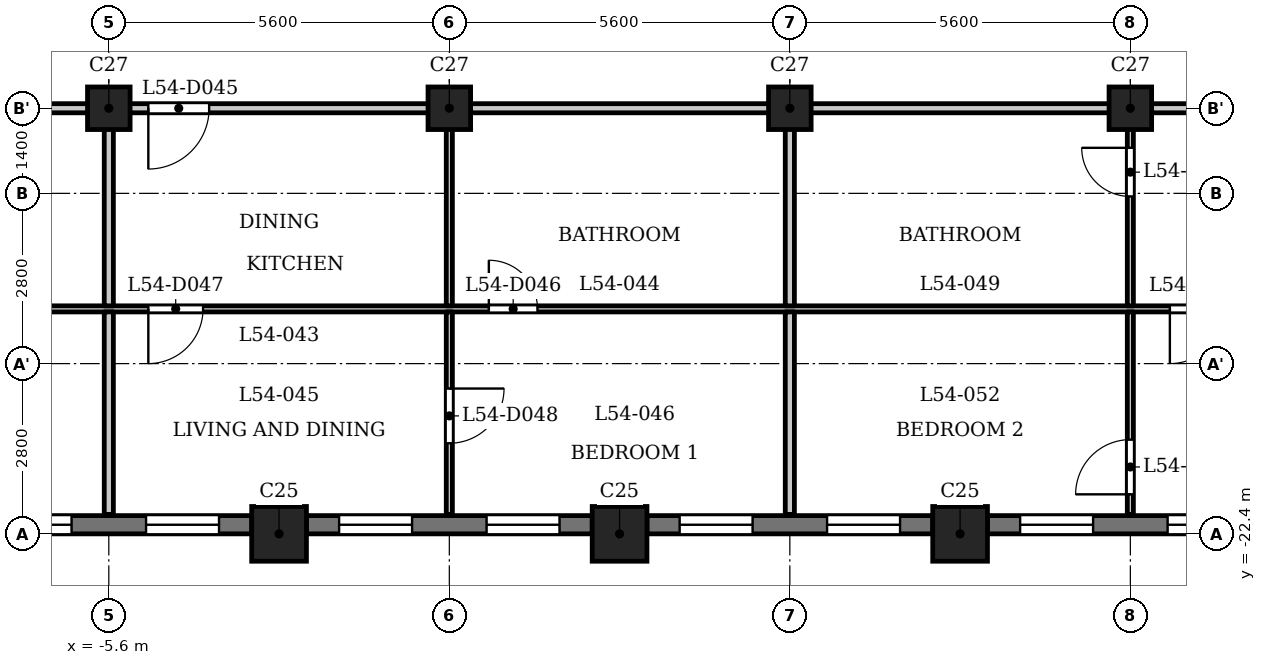
"""IFC4 building model, lengths in metres.
Left out: names, types, materials, properties, quantities, classifications, styles, units other than length and angle.
Written with IfcOpenShell. Run it as: python <this file> out.ifc"""

import sys

from ifc_helpers import new_model, si_unit, direction, frame, frame_2d, origin, origin_2d, place, context, subcontext, project, spatial, rectangle, extrude, element, fill, save


model = new_model("IFC4")
c1 = context("Model", 3, precision=1e-05, world=origin(), true_north=direction((0.0, 1.0)))
c2 = subcontext(c1, "Body", "Model", "MODEL_VIEW")
j1 = project(units=[si_unit("LENGTHUNIT", "METRE"), si_unit("PLANEANGLEUNIT", "RADIAN")], contexts=[c1])
p1 = place(None, origin())
s1 = spatial("IfcSite", under=j1, at=p1, CompositionType="ELEMENT")
p2 = place(p1, origin())
s2 = spatial("IfcBuilding", under=s1, at=p2, CompositionType="ELEMENT")
p3 = place(p2, frame((0.0, 0.0, 209.9)))
s3 = spatial("IfcBuildingStorey", under=s2, at=p3, CompositionType="ELEMENT", Elevation=209.9)
for number, where, z_axis, x_axis in (
    (1, (-2.8, -22.4, 0.0), (0.0, 0.0, 1.0), (1.0, 0.0, 0.0)),
    (2, (2.8, -22.4, 0.0), (0.0, 0.0, 1.0), (1.0, 0.0, 0.0)),
    (3, (8.4, -22.4, 0.0), (0.0, 0.0, 1.0), (1.0, 0.0, 0.0)),
):
    element("IfcColumn", number, at=place(p3, frame(where, z_axis=z_axis, x_axis=x_axis)), inside=s3, PredefinedType="COLUMN", context=c2, shape_type="SweptSolid", body=[
        extrude(rectangle(XDim=0.9, YDim=0.9, at=origin_2d()), origin(), (0.0, 0.0, 1.0), 3.5),
    ])
for number, where, z_axis, x_axis in (
    (4, (-5.6, -15.4, 0.0), (0.0, 0.0, 1.0), (1.0, 0.0, 0.0)),
    (5, (0.0, -15.4, 0.0), (0.0, 0.0, 1.0), (1.0, 0.0, 0.0)),
    (6, (5.6, -15.4, 0.0), (0.0, 0.0, 1.0), (1.0, 0.0, 0.0)),
    (7, (11.2, -15.4, 0.0), (0.0, 0.0, 1.0), (1.0, 0.0, 0.0)),
):
    element("IfcColumn", number, at=place(p3, frame(where, z_axis=z_axis, x_axis=x_axis)), inside=s3, PredefinedType="COLUMN", context=c2, shape_type="SweptSolid", body=[
        extrude(rectangle(XDim=0.7, YDim=0.7, at=origin_2d()), origin(), (0.0, 0.0, 1.0), 3.5),
    ])
p4 = place(p3, frame((-7.95, -22.25, 0.0), z_axis=(0.0, 0.0, 1.0), x_axis=(1.0, 0.0, 0.0)))
e8 = element("IfcWall", 8, at=p4, inside=s3, PredefinedType="SOLIDWALL", context=c2, shape_type="SweptSolid", body=[
    extrude(rectangle(XDim=4.7, YDim=0.3, at=frame_2d((2.35, 0.0))), origin(), (0.0, 0.0, 1.0), 2.5),
])
p5 = place(p4, frame((0.538, 0.0, 0.6)))
e9 = element("IfcOpeningElement", 9, at=p5, cuts=e8, PredefinedType="OPENING", context=c2, shape_type="SweptSolid", body=[
    extrude(rectangle(XDim=1.2, YDim=1.55, at=frame_2d((0.6, 0.775))), frame((0.0, 0.16, 0.0), z_axis=(0.0, -1.0, 0.0), x_axis=(1.0, 0.0, 0.0)), (0.0, 0.0, 1.0), 0.32),
])
p6 = place(p4, frame((2.962, 0.0, 0.6)))
e10 = element("IfcOpeningElement", 10, at=p6, cuts=e8, PredefinedType="OPENING", context=c2, shape_type="SweptSolid", body=[
    extrude(rectangle(XDim=1.2, YDim=1.55, at=frame_2d((0.6, 0.775))), frame((0.0, 0.16, 0.0), z_axis=(0.0, -1.0, 0.0), x_axis=(1.0, 0.0, 0.0)), (0.0, 0.0, 1.0), 0.32),
])
p7 = place(p3, frame((-2.35, -22.25, 0.0), z_axis=(0.0, 0.0, 1.0), x_axis=(1.0, 0.0, 0.0)))
e11 = element("IfcWall", 11, at=p7, inside=s3, PredefinedType="SOLIDWALL", context=c2, shape_type="SweptSolid", body=[
    extrude(rectangle(XDim=4.7, YDim=0.3, at=frame_2d((2.35, 0.0))), origin(), (0.0, 0.0, 1.0), 2.5),
])
p8 = place(p7, frame((0.538, 0.0, 0.6)))
e12 = element("IfcOpeningElement", 12, at=p8, cuts=e11, PredefinedType="OPENING", context=c2, shape_type="SweptSolid", body=[
    extrude(rectangle(XDim=1.2, YDim=1.55, at=frame_2d((0.6, 0.775))), frame((0.0, 0.16, 0.0), z_axis=(0.0, -1.0, 0.0), x_axis=(1.0, 0.0, 0.0)), (0.0, 0.0, 1.0), 0.32),
])
p9 = place(p7, frame((2.962, 0.0, 0.6)))
e13 = element("IfcOpeningElement", 13, at=p9, cuts=e11, PredefinedType="OPENING", context=c2, shape_type="SweptSolid", body=[
    extrude(rectangle(XDim=1.2, YDim=1.55, at=frame_2d((0.6, 0.775))), frame((0.0, 0.16, 0.0), z_axis=(0.0, -1.0, 0.0), x_axis=(1.0, 0.0, 0.0)), (0.0, 0.0, 1.0), 0.32),
])
p10 = place(p3, frame((3.25, -22.25, 0.0), z_axis=(0.0, 0.0, 1.0), x_axis=(1.0, 0.0, 0.0)))
e14 = element("IfcWall", 14, at=p10, inside=s3, PredefinedType="SOLIDWALL", context=c2, shape_type="SweptSolid", body=[
    extrude(rectangle(XDim=4.7, YDim=0.3, at=frame_2d((2.35, 0.0))), origin(), (0.0, 0.0, 1.0), 2.5),
])
p11 = place(p10, frame((0.538, 0.0, 0.6)))
e15 = element("IfcOpeningElement", 15, at=p11, cuts=e14, PredefinedType="OPENING", context=c2, shape_type="SweptSolid", body=[
    extrude(rectangle(XDim=1.2, YDim=1.55, at=frame_2d((0.6, 0.775))), frame((0.0, 0.16, 0.0), z_axis=(0.0, -1.0, 0.0), x_axis=(1.0, 0.0, 0.0)), (0.0, 0.0, 1.0), 0.32),
])
p12 = place(p10, frame((2.962, 0.0, 0.6)))
e16 = element("IfcOpeningElement", 16, at=p12, cuts=e14, PredefinedType="OPENING", context=c2, shape_type="SweptSolid", body=[
    extrude(rectangle(XDim=1.2, YDim=1.55, at=frame_2d((0.6, 0.775))), frame((0.0, 0.16, 0.0), z_axis=(0.0, -1.0, 0.0), x_axis=(1.0, 0.0, 0.0)), (0.0, 0.0, 1.0), 0.32),
])
p13 = place(p3, frame((8.85, -22.25, 0.0), z_axis=(0.0, 0.0, 1.0), x_axis=(1.0, 0.0, 0.0)))
e17 = element("IfcWall", 17, at=p13, inside=s3, PredefinedType="SOLIDWALL", context=c2, shape_type="SweptSolid", body=[
    extrude(rectangle(XDim=4.7, YDim=0.3, at=frame_2d((2.35, 0.0))), origin(), (0.0, 0.0, 1.0), 2.5),
])
p14 = place(p13, frame((0.538, 0.0, 0.6)))
e18 = element("IfcOpeningElement", 18, at=p14, cuts=e17, PredefinedType="OPENING", context=c2, shape_type="SweptSolid", body=[
    extrude(rectangle(XDim=1.2, YDim=1.55, at=frame_2d((0.6, 0.775))), frame((0.0, 0.16, 0.0), z_axis=(0.0, -1.0, 0.0), x_axis=(1.0, 0.0, 0.0)), (0.0, 0.0, 1.0), 0.32),
])
p15 = place(p13, frame((2.962, 0.0, 0.6)))
e19 = element("IfcOpeningElement", 19, at=p15, cuts=e17, PredefinedType="OPENING", context=c2, shape_type="SweptSolid", body=[
    extrude(rectangle(XDim=1.2, YDim=1.55, at=frame_2d((0.6, 0.775))), frame((0.0, 0.16, 0.0), z_axis=(0.0, -1.0, 0.0), x_axis=(1.0, 0.0, 0.0)), (0.0, 0.0, 1.0), 0.32),
])
p16 = place(p3, frame((-22.856, -18.7, 0.0), z_axis=(0.0, 0.0, 1.0), x_axis=(1.0, 0.0, 0.0)))
e20 = element("IfcWall", 20, at=p16, inside=s3, PredefinedType="PARTITIONING", context=c2, shape_type="SweptSolid", body=[
    extrude(rectangle(XDim=45.711, YDim=0.1, at=frame_2d((22.856, 0.0))), origin(), (0.0, 0.0, 1.0), 3.2),
])
p17 = place(p16, frame((4.084, 0.0, 0.0)))
e21 = element("IfcOpeningElement", 21, at=p17, cuts=e20, PredefinedType="OPENING", context=c2, shape_type="SweptSolid", body=[
    extrude(rectangle(XDim=0.9, YDim=2.1, at=frame_2d((0.45, 1.05))), frame((0.0, 0.06, 0.0), z_axis=(0.0, -1.0, 0.0), x_axis=(1.0, 0.0, 0.0)), (0.0, 0.0, 1.0), 0.12),
])
p18 = place(p16, frame((7.456, 0.0, 0.0)))
e22 = element("IfcOpeningElement", 22, at=p18, cuts=e20, PredefinedType="OPENING", context=c2, shape_type="SweptSolid", body=[
    extrude(rectangle(XDim=0.9, YDim=2.1, at=frame_2d((0.45, 1.05))), frame((0.0, 0.06, 0.0), z_axis=(0.0, -1.0, 0.0), x_axis=(1.0, 0.0, 0.0)), (0.0, 0.0, 1.0), 0.12),
])
p19 = place(p16, frame((23.506, 0.0, 0.0)))
e23 = element("IfcOpeningElement", 23, at=p19, cuts=e20, PredefinedType="OPENING", context=c2, shape_type="SweptSolid", body=[
    extrude(rectangle(XDim=0.8, YDim=2.1, at=frame_2d((0.4, 1.05))), frame((0.0, 0.06, 0.0), z_axis=(0.0, -1.0, 0.0), x_axis=(1.0, 0.0, 0.0)), (0.0, 0.0, 1.0), 0.12),
])
p20 = place(p16, frame((17.906, 0.0, 0.0)))
e24 = element("IfcOpeningElement", 24, at=p20, cuts=e20, PredefinedType="OPENING", context=c2, shape_type="SweptSolid", body=[
    extrude(rectangle(XDim=0.9, YDim=2.1, at=frame_2d((0.45, 1.05))), frame((0.0, 0.06, 0.0), z_axis=(0.0, -1.0, 0.0), x_axis=(1.0, 0.0, 0.0)), (0.0, 0.0, 1.0), 0.12),
])
p21 = place(p16, frame((43.806, 0.0, 0.0)))
e25 = element("IfcOpeningElement", 25, at=p21, cuts=e20, PredefinedType="OPENING", context=c2, shape_type="SweptSolid", body=[
    extrude(rectangle(XDim=0.9, YDim=2.1, at=frame_2d((0.45, 1.05))), frame((0.0, 0.06, 0.0), z_axis=(0.0, -1.0, 0.0), x_axis=(1.0, 0.0, 0.0)), (0.0, 0.0, 1.0), 0.12),
])
p22 = place(p16, frame((34.706, 0.0, 0.0)))
e26 = element("IfcOpeningElement", 26, at=p22, cuts=e20, PredefinedType="OPENING", context=c2, shape_type="SweptSolid", body=[
    extrude(rectangle(XDim=0.9, YDim=2.1, at=frame_2d((0.45, 1.05))), frame((0.0, 0.06, 0.0), z_axis=(0.0, -1.0, 0.0), x_axis=(1.0, 0.0, 0.0)), (0.0, 0.0, 1.0), 0.12),
])
p23 = place(p3, frame((-24.684, -15.4, 0.0), z_axis=(0.0, 0.0, 1.0), x_axis=(1.0, 0.0, 0.0)))
e27 = element("IfcWall", 27, at=p23, inside=s3, PredefinedType="PARTITIONING", context=c2, shape_type="SweptSolid", body=[
    extrude(rectangle(XDim=49.368, YDim=0.15, at=frame_2d((24.684, 0.0))), origin(), (0.0, 0.0, 1.0), 3.2),
])
p24 = place(p23, frame((1.143, 0.0, 0.0)))
e28 = element("IfcOpeningElement", 28, at=p24, cuts=e27, PredefinedType="OPENING", context=c2, shape_type="SweptSolid", body=[
    extrude(rectangle(XDim=1.0, YDim=2.1, at=frame_2d((0.5, 1.05))), frame((0.0, 0.085, 0.0), z_axis=(0.0, -1.0, 0.0), x_axis=(1.0, 0.0, 0.0)), (0.0, 0.0, 1.0), 0.17),
])
p25 = place(p23, frame((19.734, 0.0, 0.0)))
e29 = element("IfcOpeningElement", 29, at=p25, cuts=e27, PredefinedType="OPENING", context=c2, shape_type="SweptSolid", body=[
    extrude(rectangle(XDim=1.0, YDim=2.1, at=frame_2d((0.5, 1.05))), frame((0.0, 0.085, 0.0), z_axis=(0.0, -1.0, 0.0), x_axis=(1.0, 0.0, 0.0)), (0.0, 0.0, 1.0), 0.17),
])
p26 = place(p23, frame((42.134, 0.0, 0.0)))
e30 = element("IfcOpeningElement", 30, at=p26, cuts=e27, PredefinedType="OPENING", context=c2, shape_type="SweptSolid", body=[
    extrude(rectangle(XDim=1.0, YDim=2.1, at=frame_2d((0.5, 1.05))), frame((0.0, 0.085, 0.0), z_axis=(0.0, -1.0, 0.0), x_axis=(1.0, 0.0, 0.0)), (0.0, 0.0, 1.0), 0.17),
])
p27 = place(p3, frame((-5.6, -22.08, 0.0), z_axis=(0.0, 0.0, 1.0), x_axis=(0.0, 1.0, 0.0)))
e31 = element("IfcWall", 31, at=p27, inside=s3, PredefinedType="PARTITIONING", context=c2, shape_type="SweptSolid", body=[
    extrude(rectangle(XDim=3.33, YDim=0.15, at=frame_2d((1.665, 0.0))), origin(), (0.0, 0.0, 1.0), 3.2),
])
p28 = place(p3, frame((-5.6, -18.65, 0.0), z_axis=(0.0, 0.0, 1.0), x_axis=(0.0, 1.0, 0.0)))
e32 = element("IfcWall", 32, at=p28, inside=s3, PredefinedType="PARTITIONING", context=c2, shape_type="SweptSolid", body=[
    extrude(rectangle(XDim=3.175, YDim=0.15, at=frame_2d((1.587, 0.0))), origin(), (0.0, 0.0, 1.0), 3.2),
])
p29 = place(p3, frame((0.0, -22.08, 0.0), z_axis=(0.0, 0.0, 1.0), x_axis=(0.0, 1.0, 0.0)))
e33 = element("IfcWall", 33, at=p29, inside=s3, PredefinedType="PARTITIONING", context=c2, shape_type="SweptSolid", body=[
    extrude(rectangle(XDim=3.33, YDim=0.1, at=frame_2d((1.665, 0.0))), origin(), (0.0, 0.0, 1.0), 3.2),
])
p30 = place(p29, frame((1.17, 0.0, 0.0)))
e34 = element("IfcOpeningElement", 34, at=p30, cuts=e33, PredefinedType="OPENING", context=c2, shape_type="SweptSolid", body=[
    extrude(rectangle(XDim=0.9, YDim=2.1, at=frame_2d((0.45, 1.05))), frame((0.0, 0.06, 0.0), z_axis=(0.0, -1.0, 0.0), x_axis=(1.0, 0.0, 0.0)), (0.0, 0.0, 1.0), 0.12),
])
p31 = place(p3, frame((0.0, -18.65, 0.0), z_axis=(0.0, 0.0, 1.0), x_axis=(0.0, 1.0, 0.0)))
e35 = element("IfcWall", 35, at=p31, inside=s3, PredefinedType="PARTITIONING", context=c2, shape_type="SweptSolid", body=[
    extrude(rectangle(XDim=3.175, YDim=0.1, at=frame_2d((1.587, 0.0))), origin(), (0.0, 0.0, 1.0), 3.2),
])
p32 = place(p3, frame((5.6, -22.08, 0.0), z_axis=(0.0, 0.0, 1.0), x_axis=(0.0, 1.0, 0.0)))
e36 = element("IfcWall", 36, at=p32, inside=s3, PredefinedType="PARTITIONING", context=c2, shape_type="SweptSolid", body=[
    extrude(rectangle(XDim=3.33, YDim=0.15, at=frame_2d((1.665, 0.0))), origin(), (0.0, 0.0, 1.0), 3.2),
])
p33 = place(p3, frame((5.6, -18.65, 0.0), z_axis=(0.0, 0.0, 1.0), x_axis=(0.0, 1.0, 0.0)))
e37 = element("IfcWall", 37, at=p33, inside=s3, PredefinedType="PARTITIONING", context=c2, shape_type="SweptSolid", body=[
    extrude(rectangle(XDim=3.175, YDim=0.15, at=frame_2d((1.587, 0.0))), origin(), (0.0, 0.0, 1.0), 3.2),
])
p34 = place(p3, frame((11.2, -22.08, 0.0), z_axis=(0.0, 0.0, 1.0), x_axis=(0.0, 1.0, 0.0)))
e38 = element("IfcWall", 38, at=p34, inside=s3, PredefinedType="PARTITIONING", context=c2, shape_type="SweptSolid", body=[
    extrude(rectangle(XDim=3.33, YDim=0.1, at=frame_2d((1.665, 0.0))), origin(), (0.0, 0.0, 1.0), 3.2),
])
p35 = place(p34, frame((0.33, 0.0, 0.0)))
e39 = element("IfcOpeningElement", 39, at=p35, cuts=e38, PredefinedType="OPENING", context=c2, shape_type="SweptSolid", body=[
    extrude(rectangle(XDim=0.9, YDim=2.1, at=frame_2d((0.45, 1.05))), frame((0.0, 0.06, 0.0), z_axis=(0.0, -1.0, 0.0), x_axis=(1.0, 0.0, 0.0)), (0.0, 0.0, 1.0), 0.12),
])
p36 = place(p3, frame((11.2, -18.65, 0.0), z_axis=(0.0, 0.0, 1.0), x_axis=(0.0, 1.0, 0.0)))
e40 = element("IfcWall", 40, at=p36, inside=s3, PredefinedType="PARTITIONING", context=c2, shape_type="SweptSolid", body=[
    extrude(rectangle(XDim=3.175, YDim=0.1, at=frame_2d((1.587, 0.0))), origin(), (0.0, 0.0, 1.0), 3.2),
])
p37 = place(p36, frame((1.799, 0.0, 0.0)))
e41 = element("IfcOpeningElement", 41, at=p37, cuts=e40, PredefinedType="OPENING", context=c2, shape_type="SweptSolid", body=[
    extrude(rectangle(XDim=0.8, YDim=2.1, at=frame_2d((0.4, 1.05))), frame((0.0, 0.06, 0.0), z_axis=(0.0, -1.0, 0.0), x_axis=(1.0, 0.0, 0.0)), (0.0, 0.0, 1.0), 0.12),
])
p38 = place(p25, origin())
e42 = element("IfcDoor", 42, at=p38, inside=s3, OperationType="SINGLE_SWING_LEFT", PredefinedType="DOOR", context=c2, shape_type="SweptSolid", body=[
    extrude(rectangle(XDim=1.0, YDim=2.1, at=frame_2d((0.5, 1.05))), frame((0.0, 0.025, 0.0), z_axis=(0.0, -1.0, 0.0), x_axis=(1.0, 0.0, 0.0)), (0.0, 0.0, 1.0), 0.05),
])
fill(e29, e42)
p39 = place(p19, origin())
e43 = element("IfcDoor", 43, at=p39, inside=s3, OperationType="SINGLE_SWING_RIGHT", PredefinedType="DOOR", context=c2, shape_type="SweptSolid", body=[
    extrude(rectangle(XDim=0.8, YDim=2.1, at=frame_2d((0.4, 1.05))), frame((0.0, 0.025, 0.0), z_axis=(0.0, -1.0, 0.0), x_axis=(1.0, 0.0, 0.0)), (0.0, 0.0, 1.0), 0.05),
])
fill(e23, e43)
p40 = place(p20, origin())
e44 = element("IfcDoor", 44, at=p40, inside=s3, OperationType="SINGLE_SWING_LEFT", PredefinedType="DOOR", context=c2, shape_type="SweptSolid", body=[
    extrude(rectangle(XDim=0.9, YDim=2.1, at=frame_2d((0.45, 1.05))), frame((0.0, 0.025, 0.0), z_axis=(0.0, -1.0, 0.0), x_axis=(1.0, 0.0, 0.0)), (0.0, 0.0, 1.0), 0.05),
])
fill(e24, e44)
p41 = place(p30, origin())
e45 = element("IfcDoor", 45, at=p41, inside=s3, OperationType="SINGLE_SWING_RIGHT", PredefinedType="DOOR", context=c2, shape_type="SweptSolid", body=[
    extrude(rectangle(XDim=0.9, YDim=2.1, at=frame_2d((0.45, 1.05))), frame((0.0, 0.025, 0.0), z_axis=(0.0, -1.0, 0.0), x_axis=(1.0, 0.0, 0.0)), (0.0, 0.0, 1.0), 0.05),
])
fill(e34, e45)
p42 = place(p37, origin())
e46 = element("IfcDoor", 46, at=p42, inside=s3, OperationType="SINGLE_SWING_LEFT", PredefinedType="DOOR", context=c2, shape_type="SweptSolid", body=[
    extrude(rectangle(XDim=0.8, YDim=2.1, at=frame_2d((0.4, 1.05))), frame((0.0, 0.025, 0.0), z_axis=(0.0, -1.0, 0.0), x_axis=(1.0, 0.0, 0.0)), (0.0, 0.0, 1.0), 0.05),
])
fill(e41, e46)
p43 = place(p22, origin())
e47 = element("IfcDoor", 47, at=p43, inside=s3, OperationType="SINGLE_SWING_LEFT", PredefinedType="DOOR", context=c2, shape_type="SweptSolid", body=[
    extrude(rectangle(XDim=0.9, YDim=2.1, at=frame_2d((0.45, 1.05))), frame((0.0, 0.025, 0.0), z_axis=(0.0, -1.0, 0.0), x_axis=(1.0, 0.0, 0.0)), (0.0, 0.0, 1.0), 0.05),
])
fill(e26, e47)
p44 = place(p35, origin())
e48 = element("IfcDoor", 48, at=p44, inside=s3, OperationType="SINGLE_SWING_RIGHT", PredefinedType="DOOR", context=c2, shape_type="SweptSolid", body=[
    extrude(rectangle(XDim=0.9, YDim=2.1, at=frame_2d((0.45, 1.05))), frame((0.0, 0.025, 0.0), z_axis=(0.0, -1.0, 0.0), x_axis=(1.0, 0.0, 0.0)), (0.0, 0.0, 1.0), 0.05),
])
fill(e39, e48)
p45 = place(p5, origin())
e49 = element("IfcWindow", 49, at=p45, inside=s3, PartitioningType="SINGLE_PANEL", PredefinedType="WINDOW", context=c2, shape_type="SweptSolid", body=[
    extrude(rectangle(XDim=1.2, YDim=1.55, at=frame_2d((0.6, 0.775))), frame((0.0, 0.03, 0.0), z_axis=(0.0, -1.0, 0.0), x_axis=(1.0, 0.0, 0.0)), (0.0, 0.0, 1.0), 0.06),
])
fill(e9, e49)
p46 = place(p6, origin())
e50 = element("IfcWindow", 50, at=p46, inside=s3, PartitioningType="SINGLE_PANEL", PredefinedType="WINDOW", context=c2, shape_type="SweptSolid", body=[
    extrude(rectangle(XDim=1.2, YDim=1.55, at=frame_2d((0.6, 0.775))), frame((0.0, 0.03, 0.0), z_axis=(0.0, -1.0, 0.0), x_axis=(1.0, 0.0, 0.0)), (0.0, 0.0, 1.0), 0.06),
])
fill(e10, e50)
p47 = place(p8, origin())
e51 = element("IfcWindow", 51, at=p47, inside=s3, PartitioningType="SINGLE_PANEL", PredefinedType="WINDOW", context=c2, shape_type="SweptSolid", body=[
    extrude(rectangle(XDim=1.2, YDim=1.55, at=frame_2d((0.6, 0.775))), frame((0.0, 0.03, 0.0), z_axis=(0.0, -1.0, 0.0), x_axis=(1.0, 0.0, 0.0)), (0.0, 0.0, 1.0), 0.06),
])
fill(e12, e51)
p48 = place(p9, origin())
e52 = element("IfcWindow", 52, at=p48, inside=s3, PartitioningType="SINGLE_PANEL", PredefinedType="WINDOW", context=c2, shape_type="SweptSolid", body=[
    extrude(rectangle(XDim=1.2, YDim=1.55, at=frame_2d((0.6, 0.775))), frame((0.0, 0.03, 0.0), z_axis=(0.0, -1.0, 0.0), x_axis=(1.0, 0.0, 0.0)), (0.0, 0.0, 1.0), 0.06),
])
fill(e13, e52)
p49 = place(p11, origin())
e53 = element("IfcWindow", 53, at=p49, inside=s3, PartitioningType="SINGLE_PANEL", PredefinedType="WINDOW", context=c2, shape_type="SweptSolid", body=[
    extrude(rectangle(XDim=1.2, YDim=1.55, at=frame_2d((0.6, 0.775))), frame((0.0, 0.03, 0.0), z_axis=(0.0, -1.0, 0.0), x_axis=(1.0, 0.0, 0.0)), (0.0, 0.0, 1.0), 0.06),
])
fill(e15, e53)
p50 = place(p12, origin())
e54 = element("IfcWindow", 54, at=p50, inside=s3, PartitioningType="SINGLE_PANEL", PredefinedType="WINDOW", context=c2, shape_type="SweptSolid", body=[
    extrude(rectangle(XDim=1.2, YDim=1.55, at=frame_2d((0.6, 0.775))), frame((0.0, 0.03, 0.0), z_axis=(0.0, -1.0, 0.0), x_axis=(1.0, 0.0, 0.0)), (0.0, 0.0, 1.0), 0.06),
])
fill(e16, e54)
p51 = place(p14, origin())
e55 = element("IfcWindow", 55, at=p51, inside=s3, PartitioningType="SINGLE_PANEL", PredefinedType="WINDOW", context=c2, shape_type="SweptSolid", body=[
    extrude(rectangle(XDim=1.2, YDim=1.55, at=frame_2d((0.6, 0.775))), frame((0.0, 0.03, 0.0), z_axis=(0.0, -1.0, 0.0), x_axis=(1.0, 0.0, 0.0)), (0.0, 0.0, 1.0), 0.06),
])
fill(e18, e55)
p52 = place(p15, origin())
e56 = element("IfcWindow", 56, at=p52, inside=s3, PartitioningType="SINGLE_PANEL", PredefinedType="WINDOW", context=c2, shape_type="SweptSolid", body=[
    extrude(rectangle(XDim=1.2, YDim=1.55, at=frame_2d((0.6, 0.775))), frame((0.0, 0.03, 0.0), z_axis=(0.0, -1.0, 0.0), x_axis=(1.0, 0.0, 0.0)), (0.0, 0.0, 1.0), 0.06),
])
fill(e19, e56)
save(model, sys.argv[1])
